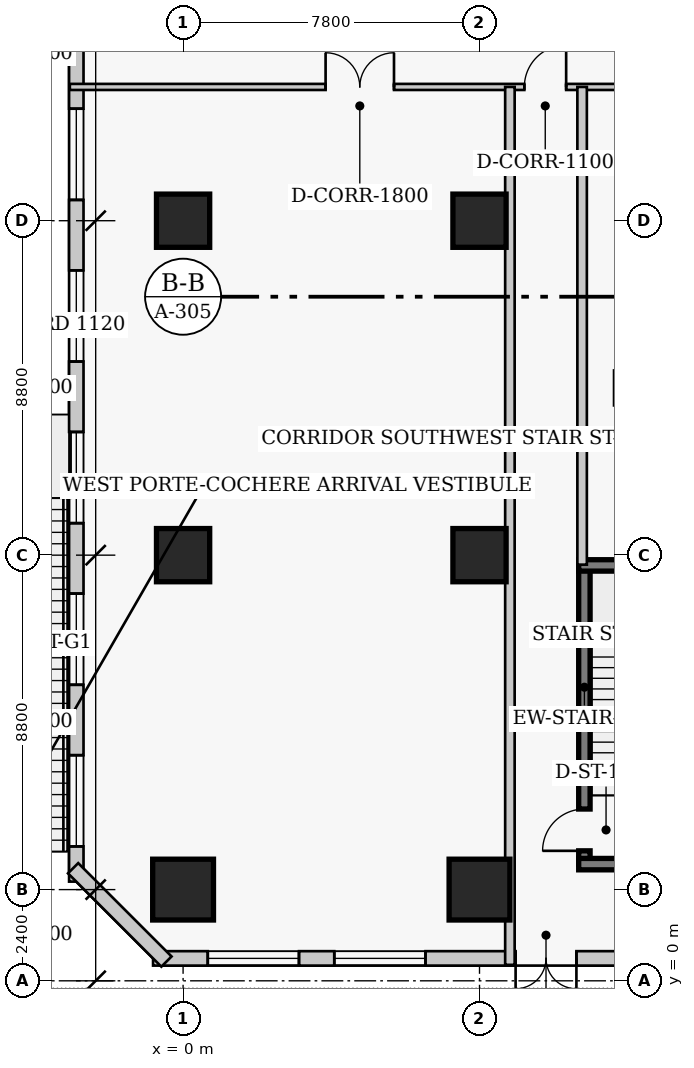
"""IFC4 building model, lengths in metres.
Left out: names, types, materials, properties, quantities, classifications, styles, units other than length and angle.
Written with IfcOpenShell. Run it as: python <this file> out.ifc"""

import sys

from ifc_helpers import new_model, si_unit, direction, frame, frame_2d, origin, origin_2d, place, context, subcontext, project, spatial, rectangle, extrude, element, fill, save


model = new_model("IFC4")
c1 = context("Model", 3, precision=1e-05, world=origin(), true_north=direction((0.0, 1.0)))
c2 = subcontext(c1, "Body", "Model", "MODEL_VIEW")
j1 = project(units=[si_unit("LENGTHUNIT", "METRE"), si_unit("PLANEANGLEUNIT", "RADIAN")], contexts=[c1])
p1 = place(None, origin())
s1 = spatial("IfcSite", under=j1, at=p1, CompositionType="ELEMENT")
p2 = place(p1, origin())
s2 = spatial("IfcBuilding", under=s1, at=p2, CompositionType="ELEMENT")
p3 = place(p2, origin())
s3 = spatial("IfcBuildingStorey", under=s2, at=p3, CompositionType="ELEMENT", Elevation=0.0)
p4 = place(p3, frame((10.56, 3.07, 0.0), z_axis=(0.0, 0.0, 1.0), x_axis=(0.0, 1.0, 0.0)))
e1 = element("IfcWall", 1, at=p4, inside=s3, PredefinedType="SHEAR", context=c2, shape_type="SweptSolid", body=[
    extrude(rectangle(XDim=7.86, YDim=0.3, at=frame_2d((3.93, 0.0))), origin(), (0.0, 0.0, 1.0), 5.4),
])
p5 = place(p4, frame((0.35, 0.0, 0.0)))
e2 = element("IfcOpeningElement", 2, at=p5, cuts=e1, PredefinedType="OPENING", context=c2, shape_type="SweptSolid", body=[
    extrude(rectangle(XDim=1.1, YDim=2.15, at=frame_2d((0.55, 1.075))), frame((0.0, 0.16, 0.0), z_axis=(0.0, -1.0, 0.0), x_axis=(1.0, 0.0, 0.0)), (0.0, 0.0, 1.0), 0.32),
])
for number, where, z_axis, x_axis in (
    (3, (10.41, 10.93, 0.0), (0.0, 0.0, 1.0), (1.0, 0.0, 0.0)),
    (4, (10.41, 3.07, 0.0), (0.0, 0.0, 1.0), (1.0, 0.0, 0.0)),
):
    element("IfcWall", number, at=place(p3, frame(where, z_axis=z_axis, x_axis=x_axis)), inside=s3, PredefinedType="SHEAR", context=c2, shape_type="SweptSolid", body=[
        extrude(rectangle(XDim=4.07, YDim=0.3, at=frame_2d((2.035, 0.0))), origin(), (0.0, 0.0, 1.0), 5.4),
    ])
p6 = place(p3, frame((0.0, 2.4, 0.0), z_axis=(0.0, 0.0, 1.0), x_axis=(1.0, 0.0, 0.0)))
e5 = element("IfcColumn", 5, at=p6, inside=s3, PredefinedType="COLUMN", context=c2, shape_type="SweptSolid", body=[
    extrude(rectangle(XDim=1.6, YDim=1.6, at=origin_2d()), origin(), (0.0, 0.0, 1.0), 5.4),
])
for number, where, z_axis, x_axis in (
    (6, (0.0, 11.2, 0.0), (0.0, 0.0, 1.0), (1.0, 0.0, 0.0)),
    (7, (0.0, 20.0, 0.0), (0.0, 0.0, 1.0), (1.0, 0.0, 0.0)),
):
    element("IfcColumn", number, at=place(p3, frame(where, z_axis=z_axis, x_axis=x_axis)), inside=s3, PredefinedType="COLUMN", context=c2, shape_type="SweptSolid", body=[
        extrude(rectangle(XDim=1.4, YDim=1.4, at=origin_2d()), origin(), (0.0, 0.0, 1.0), 5.4),
    ])
p7 = place(p3, frame((7.8, 2.4, 0.0), z_axis=(0.0, 0.0, 1.0), x_axis=(1.0, 0.0, 0.0)))
e8 = element("IfcColumn", 8, at=p7, inside=s3, PredefinedType="COLUMN", context=c2, shape_type="SweptSolid", body=[
    extrude(rectangle(XDim=1.6, YDim=1.6, at=origin_2d()), origin(), (0.0, 0.0, 1.0), 5.4),
])
for number, where, z_axis, x_axis in (
    (9, (7.8, 11.2, 0.0), (0.0, 0.0, 1.0), (1.0, 0.0, 0.0)),
    (10, (7.8, 20.0, 0.0), (0.0, 0.0, 1.0), (1.0, 0.0, 0.0)),
):
    element("IfcColumn", number, at=place(p3, frame(where, z_axis=z_axis, x_axis=x_axis)), inside=s3, PredefinedType="COLUMN", context=c2, shape_type="SweptSolid", body=[
        extrude(rectangle(XDim=1.4, YDim=1.4, at=origin_2d()), origin(), (0.0, 0.0, 1.0), 5.4),
    ])
p8 = place(p3, frame((78.79, 0.59, 0.0), z_axis=(0.0, 0.0, 1.0), x_axis=(-1.0, 0.0, 0.0)))
e11 = element("IfcWall", 11, at=p8, inside=s3, PredefinedType="SOLIDWALL", context=c2, shape_type="SweptSolid", body=[
    extrude(rectangle(XDim=79.58, YDim=0.38, at=frame_2d((39.79, 0.0))), origin(), (0.0, 0.0, 1.0), 5.1),
])
p9 = place(p8, frame((68.44, 0.0, 0.0)))
e12 = element("IfcOpeningElement", 12, at=p9, cuts=e11, PredefinedType="OPENING", context=c2, shape_type="SweptSolid", body=[
    extrude(rectangle(XDim=1.6, YDim=2.2, at=frame_2d((0.8, 1.1))), frame((0.0, 0.2, 0.0), z_axis=(0.0, -1.0, 0.0), x_axis=(1.0, 0.0, 0.0)), (0.0, 0.0, 1.0), 0.4),
])
p10 = place(p8, frame((56.79, 0.0, 0.0)))
e13 = element("IfcOpeningElement", 13, at=p10, cuts=e11, PredefinedType="OPENING", context=c2, shape_type="SweptSolid", body=[
    extrude(rectangle(XDim=2.4, YDim=2.55, at=frame_2d((1.2, 1.275))), frame((0.0, 0.2, 0.0), z_axis=(0.0, -1.0, 0.0), x_axis=(1.0, 0.0, 0.0)), (0.0, 0.0, 1.0), 0.4),
])
p11 = place(p8, frame((38.59, 0.0, 0.0)))
e14 = element("IfcOpeningElement", 14, at=p11, cuts=e11, PredefinedType="OPENING", context=c2, shape_type="SweptSolid", body=[
    extrude(rectangle(XDim=2.4, YDim=2.55, at=frame_2d((1.2, 1.275))), frame((0.0, 0.2, 0.0), z_axis=(0.0, -1.0, 0.0), x_axis=(1.0, 0.0, 0.0)), (0.0, 0.0, 1.0), 0.4),
])
p12 = place(p8, frame((19.49, 0.0, 0.0)))
e15 = element("IfcOpeningElement", 15, at=p12, cuts=e11, PredefinedType="OPENING", context=c2, shape_type="SweptSolid", body=[
    extrude(rectangle(XDim=1.6, YDim=2.2, at=frame_2d((0.8, 1.1))), frame((0.0, 0.2, 0.0), z_axis=(0.0, -1.0, 0.0), x_axis=(1.0, 0.0, 0.0)), (0.0, 0.0, 1.0), 0.4),
])
p13 = place(p8, frame((1.439, 0.0, 0.75)))
e16 = element("IfcOpeningElement", 16, at=p13, cuts=e11, PredefinedType="OPENING", context=c2, shape_type="SweptSolid", body=[
    extrude(rectangle(XDim=2.4, YDim=2.2, at=frame_2d((1.2, 1.1))), frame((0.0, 0.2, 0.0), z_axis=(0.0, -1.0, 0.0), x_axis=(1.0, 0.0, 0.0)), (0.0, 0.0, 1.0), 0.4),
])
p14 = place(p8, frame((4.769, 0.0, 0.75)))
e17 = element("IfcOpeningElement", 17, at=p14, cuts=e11, PredefinedType="OPENING", context=c2, shape_type="SweptSolid", body=[
    extrude(rectangle(XDim=2.4, YDim=2.2, at=frame_2d((1.2, 1.1))), frame((0.0, 0.2, 0.0), z_axis=(0.0, -1.0, 0.0), x_axis=(1.0, 0.0, 0.0)), (0.0, 0.0, 1.0), 0.4),
])
p15 = place(p8, frame((8.748, 0.0, 0.75)))
e18 = element("IfcOpeningElement", 18, at=p15, cuts=e11, PredefinedType="OPENING", context=c2, shape_type="SweptSolid", body=[
    extrude(rectangle(XDim=2.4, YDim=2.2, at=frame_2d((1.2, 1.1))), frame((0.0, 0.2, 0.0), z_axis=(0.0, -1.0, 0.0), x_axis=(1.0, 0.0, 0.0)), (0.0, 0.0, 1.0), 0.4),
])
p16 = place(p8, frame((12.727, 0.0, 0.75)))
e19 = element("IfcOpeningElement", 19, at=p16, cuts=e11, PredefinedType="OPENING", context=c2, shape_type="SweptSolid", body=[
    extrude(rectangle(XDim=2.4, YDim=2.2, at=frame_2d((1.2, 1.1))), frame((0.0, 0.2, 0.0), z_axis=(0.0, -1.0, 0.0), x_axis=(1.0, 0.0, 0.0)), (0.0, 0.0, 1.0), 0.4),
])
p17 = place(p8, frame((24.664, 0.0, 0.75)))
e20 = element("IfcOpeningElement", 20, at=p17, cuts=e11, PredefinedType="OPENING", context=c2, shape_type="SweptSolid", body=[
    extrude(rectangle(XDim=2.4, YDim=2.2, at=frame_2d((1.2, 1.1))), frame((0.0, 0.2, 0.0), z_axis=(0.0, -1.0, 0.0), x_axis=(1.0, 0.0, 0.0)), (0.0, 0.0, 1.0), 0.4),
])
p18 = place(p8, frame((28.643, 0.0, 0.75)))
e21 = element("IfcOpeningElement", 21, at=p18, cuts=e11, PredefinedType="OPENING", context=c2, shape_type="SweptSolid", body=[
    extrude(rectangle(XDim=2.4, YDim=2.2, at=frame_2d((1.2, 1.1))), frame((0.0, 0.2, 0.0), z_axis=(0.0, -1.0, 0.0), x_axis=(1.0, 0.0, 0.0)), (0.0, 0.0, 1.0), 0.4),
])
p19 = place(p8, frame((32.622, 0.0, 0.75)))
e22 = element("IfcOpeningElement", 22, at=p19, cuts=e11, PredefinedType="OPENING", context=c2, shape_type="SweptSolid", body=[
    extrude(rectangle(XDim=2.4, YDim=2.2, at=frame_2d((1.2, 1.1))), frame((0.0, 0.2, 0.0), z_axis=(0.0, -1.0, 0.0), x_axis=(1.0, 0.0, 0.0)), (0.0, 0.0, 1.0), 0.4),
])
p20 = place(p8, frame((44.559, 0.0, 0.75)))
e23 = element("IfcOpeningElement", 23, at=p20, cuts=e11, PredefinedType="OPENING", context=c2, shape_type="SweptSolid", body=[
    extrude(rectangle(XDim=2.4, YDim=2.2, at=frame_2d((1.2, 1.1))), frame((0.0, 0.2, 0.0), z_axis=(0.0, -1.0, 0.0), x_axis=(1.0, 0.0, 0.0)), (0.0, 0.0, 1.0), 0.4),
])
p21 = place(p8, frame((48.538, 0.0, 0.75)))
e24 = element("IfcOpeningElement", 24, at=p21, cuts=e11, PredefinedType="OPENING", context=c2, shape_type="SweptSolid", body=[
    extrude(rectangle(XDim=2.4, YDim=2.2, at=frame_2d((1.2, 1.1))), frame((0.0, 0.2, 0.0), z_axis=(0.0, -1.0, 0.0), x_axis=(1.0, 0.0, 0.0)), (0.0, 0.0, 1.0), 0.4),
])
p22 = place(p8, frame((52.517, 0.0, 0.75)))
e25 = element("IfcOpeningElement", 25, at=p22, cuts=e11, PredefinedType="OPENING", context=c2, shape_type="SweptSolid", body=[
    extrude(rectangle(XDim=2.4, YDim=2.2, at=frame_2d((1.2, 1.1))), frame((0.0, 0.2, 0.0), z_axis=(0.0, -1.0, 0.0), x_axis=(1.0, 0.0, 0.0)), (0.0, 0.0, 1.0), 0.4),
])
p23 = place(p8, frame((60.475, 0.0, 0.75)))
e26 = element("IfcOpeningElement", 26, at=p23, cuts=e11, PredefinedType="OPENING", context=c2, shape_type="SweptSolid", body=[
    extrude(rectangle(XDim=2.4, YDim=2.2, at=frame_2d((1.2, 1.1))), frame((0.0, 0.2, 0.0), z_axis=(0.0, -1.0, 0.0), x_axis=(1.0, 0.0, 0.0)), (0.0, 0.0, 1.0), 0.4),
])
p24 = place(p8, frame((72.412, 0.0, 0.75)))
e27 = element("IfcOpeningElement", 27, at=p24, cuts=e11, PredefinedType="OPENING", context=c2, shape_type="SweptSolid", body=[
    extrude(rectangle(XDim=2.4, YDim=2.2, at=frame_2d((1.2, 1.1))), frame((0.0, 0.2, 0.0), z_axis=(0.0, -1.0, 0.0), x_axis=(1.0, 0.0, 0.0)), (0.0, 0.0, 1.0), 0.4),
])
p25 = place(p8, frame((75.74, 0.0, 0.75)))
e28 = element("IfcOpeningElement", 28, at=p25, cuts=e11, PredefinedType="OPENING", context=c2, shape_type="SweptSolid", body=[
    extrude(rectangle(XDim=2.4, YDim=2.2, at=frame_2d((1.2, 1.1))), frame((0.0, 0.2, 0.0), z_axis=(0.0, -1.0, 0.0), x_axis=(1.0, 0.0, 0.0)), (0.0, 0.0, 1.0), 0.4),
])
p26 = place(p3, frame((-2.81, 2.61, 0.0), z_axis=(0.0, 0.0, 1.0), x_axis=(0.0, 1.0, 0.0)))
e29 = element("IfcWall", 29, at=p26, inside=s3, PredefinedType="SOLIDWALL", context=c2, shape_type="SweptSolid", body=[
    extrude(rectangle(XDim=46.78, YDim=0.38, at=frame_2d((23.39, 0.0))), origin(), (0.0, 0.0, 1.0), 5.1),
])
p27 = place(p26, frame((0.927, 0.0, 0.75)))
e30 = element("IfcOpeningElement", 30, at=p27, cuts=e29, PredefinedType="OPENING", context=c2, shape_type="SweptSolid", body=[
    extrude(rectangle(XDim=2.4, YDim=2.2, at=frame_2d((1.2, 1.1))), frame((0.0, 0.2, 0.0), z_axis=(0.0, -1.0, 0.0), x_axis=(1.0, 0.0, 0.0)), (0.0, 0.0, 1.0), 0.4),
])
p28 = place(p26, frame((5.179, 0.0, 0.75)))
e31 = element("IfcOpeningElement", 31, at=p28, cuts=e29, PredefinedType="OPENING", context=c2, shape_type="SweptSolid", body=[
    extrude(rectangle(XDim=2.4, YDim=2.2, at=frame_2d((1.2, 1.1))), frame((0.0, 0.2, 0.0), z_axis=(0.0, -1.0, 0.0), x_axis=(1.0, 0.0, 0.0)), (0.0, 0.0, 1.0), 0.4),
])
p29 = place(p26, frame((9.432, 0.0, 0.75)))
e32 = element("IfcOpeningElement", 32, at=p29, cuts=e29, PredefinedType="OPENING", context=c2, shape_type="SweptSolid", body=[
    extrude(rectangle(XDim=2.4, YDim=2.2, at=frame_2d((1.2, 1.1))), frame((0.0, 0.2, 0.0), z_axis=(0.0, -1.0, 0.0), x_axis=(1.0, 0.0, 0.0)), (0.0, 0.0, 1.0), 0.4),
])
p30 = place(p26, frame((13.685, 0.0, 0.75)))
e33 = element("IfcOpeningElement", 33, at=p30, cuts=e29, PredefinedType="OPENING", context=c2, shape_type="SweptSolid", body=[
    extrude(rectangle(XDim=2.4, YDim=2.2, at=frame_2d((1.2, 1.1))), frame((0.0, 0.2, 0.0), z_axis=(0.0, -1.0, 0.0), x_axis=(1.0, 0.0, 0.0)), (0.0, 0.0, 1.0), 0.4),
])
p31 = place(p26, frame((17.937, 0.0, 0.75)))
e34 = element("IfcOpeningElement", 34, at=p31, cuts=e29, PredefinedType="OPENING", context=c2, shape_type="SweptSolid", body=[
    extrude(rectangle(XDim=2.4, YDim=2.2, at=frame_2d((1.2, 1.1))), frame((0.0, 0.2, 0.0), z_axis=(0.0, -1.0, 0.0), x_axis=(1.0, 0.0, 0.0)), (0.0, 0.0, 1.0), 0.4),
])
p32 = place(p26, frame((26.443, 0.0, 0.75)))
e35 = element("IfcOpeningElement", 35, at=p32, cuts=e29, PredefinedType="OPENING", context=c2, shape_type="SweptSolid", body=[
    extrude(rectangle(XDim=2.4, YDim=2.2, at=frame_2d((1.2, 1.1))), frame((0.0, 0.2, 0.0), z_axis=(0.0, -1.0, 0.0), x_axis=(1.0, 0.0, 0.0)), (0.0, 0.0, 1.0), 0.4),
])
p33 = place(p26, frame((30.696, 0.0, 0.75)))
e36 = element("IfcOpeningElement", 36, at=p33, cuts=e29, PredefinedType="OPENING", context=c2, shape_type="SweptSolid", body=[
    extrude(rectangle(XDim=2.4, YDim=2.2, at=frame_2d((1.2, 1.1))), frame((0.0, 0.2, 0.0), z_axis=(0.0, -1.0, 0.0), x_axis=(1.0, 0.0, 0.0)), (0.0, 0.0, 1.0), 0.4),
])
p34 = place(p26, frame((34.948, 0.0, 0.75)))
e37 = element("IfcOpeningElement", 37, at=p34, cuts=e29, PredefinedType="OPENING", context=c2, shape_type="SweptSolid", body=[
    extrude(rectangle(XDim=2.4, YDim=2.2, at=frame_2d((1.2, 1.1))), frame((0.0, 0.2, 0.0), z_axis=(0.0, -1.0, 0.0), x_axis=(1.0, 0.0, 0.0)), (0.0, 0.0, 1.0), 0.4),
])
p35 = place(p26, frame((39.201, 0.0, 0.75)))
e38 = element("IfcOpeningElement", 38, at=p35, cuts=e29, PredefinedType="OPENING", context=c2, shape_type="SweptSolid", body=[
    extrude(rectangle(XDim=2.4, YDim=2.2, at=frame_2d((1.2, 1.1))), frame((0.0, 0.2, 0.0), z_axis=(0.0, -1.0, 0.0), x_axis=(1.0, 0.0, 0.0)), (0.0, 0.0, 1.0), 0.4),
])
p36 = place(p26, frame((43.454, 0.0, 0.75)))
e39 = element("IfcOpeningElement", 39, at=p36, cuts=e29, PredefinedType="OPENING", context=c2, shape_type="SweptSolid", body=[
    extrude(rectangle(XDim=2.4, YDim=2.2, at=frame_2d((1.2, 1.1))), frame((0.0, 0.2, 0.0), z_axis=(0.0, -1.0, 0.0), x_axis=(1.0, 0.0, 0.0)), (0.0, 0.0, 1.0), 0.4),
])
p37 = place(p3, frame((-0.438, 0.506, 0.0), z_axis=(0.0, 0.0, 1.0), x_axis=(-0.707071641081, 0.707141919546, 0.0)))
e40 = element("IfcWall", 40, at=p37, inside=s3, PredefinedType="SOLIDWALL", context=c2, shape_type="SweptSolid", body=[
    extrude(rectangle(XDim=3.474, YDim=0.38, at=frame_2d((1.737, 0.0))), origin(), (0.0, 0.0, 1.0), 5.1),
])
p38 = place(p3, frame((-2.98, 23.52, 0.0), z_axis=(0.0, 0.0, 1.0), x_axis=(1.0, 0.0, 0.0)))
e41 = element("IfcWall", 41, at=p38, inside=s3, PredefinedType="PARTITIONING", context=c2, shape_type="SweptSolid", body=[
    extrude(rectangle(XDim=83.96, YDim=0.16, at=frame_2d((41.98, 0.0))), origin(), (0.0, 0.0, 1.0), 5.1),
])
p39 = place(p38, frame((11.96, 0.0, 0.0)))
e42 = element("IfcOpeningElement", 42, at=p39, cuts=e41, PredefinedType="OPENING", context=c2, shape_type="SweptSolid", body=[
    extrude(rectangle(XDim=1.1, YDim=2.15, at=frame_2d((0.55, 1.075))), frame((0.0, 0.09, 0.0), z_axis=(0.0, -1.0, 0.0), x_axis=(1.0, 0.0, 0.0)), (0.0, 0.0, 1.0), 0.18),
])
p40 = place(p38, frame((6.73, 0.0, 0.0)))
e43 = element("IfcOpeningElement", 43, at=p40, cuts=e41, PredefinedType="OPENING", context=c2, shape_type="SweptSolid", body=[
    extrude(rectangle(XDim=1.8, YDim=2.2, at=frame_2d((0.9, 1.1))), frame((0.0, 0.09, 0.0), z_axis=(0.0, -1.0, 0.0), x_axis=(1.0, 0.0, 0.0)), (0.0, 0.0, 1.0), 0.18),
])
p41 = place(p38, frame((24.38, 0.0, 0.0)))
e44 = element("IfcOpeningElement", 44, at=p41, cuts=e41, PredefinedType="OPENING", context=c2, shape_type="SweptSolid", body=[
    extrude(rectangle(XDim=2.2, YDim=2.4, at=frame_2d((1.1, 1.2))), frame((0.0, 0.09, 0.0), z_axis=(0.0, -1.0, 0.0), x_axis=(1.0, 0.0, 0.0)), (0.0, 0.0, 1.0), 0.18),
])
p42 = place(p38, frame((40.88, 0.0, 0.0)))
e45 = element("IfcOpeningElement", 45, at=p42, cuts=e41, PredefinedType="OPENING", context=c2, shape_type="SweptSolid", body=[
    extrude(rectangle(XDim=2.2, YDim=2.4, at=frame_2d((1.1, 1.2))), frame((0.0, 0.09, 0.0), z_axis=(0.0, -1.0, 0.0), x_axis=(1.0, 0.0, 0.0)), (0.0, 0.0, 1.0), 0.18),
])
p43 = place(p38, frame((56.63, 0.0, 0.0)))
e46 = element("IfcOpeningElement", 46, at=p43, cuts=e41, PredefinedType="OPENING", context=c2, shape_type="SweptSolid", body=[
    extrude(rectangle(XDim=2.2, YDim=2.4, at=frame_2d((1.1, 1.2))), frame((0.0, 0.09, 0.0), z_axis=(0.0, -1.0, 0.0), x_axis=(1.0, 0.0, 0.0)), (0.0, 0.0, 1.0), 0.18),
])
p44 = place(p38, frame((67.14, 0.0, 0.0)))
e47 = element("IfcOpeningElement", 47, at=p44, cuts=e41, PredefinedType="OPENING", context=c2, shape_type="SweptSolid", body=[
    extrude(rectangle(XDim=0.88, YDim=2.05, at=frame_2d((0.44, 1.025))), frame((0.0, 0.09, 0.0), z_axis=(0.0, -1.0, 0.0), x_axis=(1.0, 0.0, 0.0)), (0.0, 0.0, 1.0), 0.18),
])
p45 = place(p38, frame((73.29, 0.0, 0.0)))
e48 = element("IfcOpeningElement", 48, at=p45, cuts=e41, PredefinedType="OPENING", context=c2, shape_type="SweptSolid", body=[
    extrude(rectangle(XDim=0.88, YDim=2.05, at=frame_2d((0.44, 1.025))), frame((0.0, 0.09, 0.0), z_axis=(0.0, -1.0, 0.0), x_axis=(1.0, 0.0, 0.0)), (0.0, 0.0, 1.0), 0.18),
])
p46 = place(p3, frame((8.6, 0.42, 0.0), z_axis=(0.0, 0.0, 1.0), x_axis=(0.0, 1.0, 0.0)))
e49 = element("IfcWall", 49, at=p46, inside=s3, PredefinedType="SOLIDWALL", context=c2, shape_type="SweptSolid", body=[
    extrude(rectangle(XDim=23.1, YDim=0.25, at=frame_2d((11.55, 0.0))), origin(), (0.0, 0.0, 1.0), 5.1),
])
p47 = place(p3, frame((10.5, 10.95, 0.0), z_axis=(0.0, 0.0, 1.0), x_axis=(0.0, 1.0, 0.0)))
e50 = element("IfcWall", 50, at=p47, inside=s3, PredefinedType="SOLIDWALL", context=c2, shape_type="SweptSolid", body=[
    extrude(rectangle(XDim=12.57, YDim=0.25, at=frame_2d((6.285, 0.0))), origin(), (0.0, 0.0, 1.0), 5.1),
])
p48 = place(p9, origin())
e51 = element("IfcDoor", 51, at=p48, inside=s3, OperationType="DOUBLE_DOOR_SINGLE_SWING", PredefinedType="DOOR", context=c2, shape_type="SweptSolid", body=[
    extrude(rectangle(XDim=1.6, YDim=2.2, at=frame_2d((0.8, 1.1))), frame((0.0, 0.025, 0.0), z_axis=(0.0, -1.0, 0.0), x_axis=(1.0, 0.0, 0.0)), (0.0, 0.0, 1.0), 0.05),
])
fill(e12, e51)
p49 = place(p24, origin())
e52 = element("IfcWindow", 52, at=p49, inside=s3, PartitioningType="SINGLE_PANEL", PredefinedType="WINDOW", context=c2, shape_type="SweptSolid", body=[
    extrude(rectangle(XDim=2.4, YDim=2.2, at=frame_2d((1.2, 1.1))), frame((0.0, 0.03, 0.0), z_axis=(0.0, -1.0, 0.0), x_axis=(1.0, 0.0, 0.0)), (0.0, 0.0, 1.0), 0.06),
])
fill(e27, e52)
p50 = place(p25, origin())
e53 = element("IfcWindow", 53, at=p50, inside=s3, PartitioningType="SINGLE_PANEL", PredefinedType="WINDOW", context=c2, shape_type="SweptSolid", body=[
    extrude(rectangle(XDim=2.4, YDim=2.2, at=frame_2d((1.2, 1.1))), frame((0.0, 0.03, 0.0), z_axis=(0.0, -1.0, 0.0), x_axis=(1.0, 0.0, 0.0)), (0.0, 0.0, 1.0), 0.06),
])
fill(e28, e53)
p51 = place(p27, origin())
e54 = element("IfcWindow", 54, at=p51, inside=s3, PartitioningType="SINGLE_PANEL", PredefinedType="WINDOW", context=c2, shape_type="SweptSolid", body=[
    extrude(rectangle(XDim=2.4, YDim=2.2, at=frame_2d((1.2, 1.1))), frame((0.0, 0.03, 0.0), z_axis=(0.0, -1.0, 0.0), x_axis=(1.0, 0.0, 0.0)), (0.0, 0.0, 1.0), 0.06),
])
fill(e30, e54)
p52 = place(p28, origin())
e55 = element("IfcWindow", 55, at=p52, inside=s3, PartitioningType="SINGLE_PANEL", PredefinedType="WINDOW", context=c2, shape_type="SweptSolid", body=[
    extrude(rectangle(XDim=2.4, YDim=2.2, at=frame_2d((1.2, 1.1))), frame((0.0, 0.03, 0.0), z_axis=(0.0, -1.0, 0.0), x_axis=(1.0, 0.0, 0.0)), (0.0, 0.0, 1.0), 0.06),
])
fill(e31, e55)
p53 = place(p29, origin())
e56 = element("IfcWindow", 56, at=p53, inside=s3, PartitioningType="SINGLE_PANEL", PredefinedType="WINDOW", context=c2, shape_type="SweptSolid", body=[
    extrude(rectangle(XDim=2.4, YDim=2.2, at=frame_2d((1.2, 1.1))), frame((0.0, 0.03, 0.0), z_axis=(0.0, -1.0, 0.0), x_axis=(1.0, 0.0, 0.0)), (0.0, 0.0, 1.0), 0.06),
])
fill(e32, e56)
p54 = place(p30, origin())
e57 = element("IfcWindow", 57, at=p54, inside=s3, PartitioningType="SINGLE_PANEL", PredefinedType="WINDOW", context=c2, shape_type="SweptSolid", body=[
    extrude(rectangle(XDim=2.4, YDim=2.2, at=frame_2d((1.2, 1.1))), frame((0.0, 0.03, 0.0), z_axis=(0.0, -1.0, 0.0), x_axis=(1.0, 0.0, 0.0)), (0.0, 0.0, 1.0), 0.06),
])
fill(e33, e57)
p55 = place(p31, origin())
e58 = element("IfcWindow", 58, at=p55, inside=s3, PartitioningType="SINGLE_PANEL", PredefinedType="WINDOW", context=c2, shape_type="SweptSolid", body=[
    extrude(rectangle(XDim=2.4, YDim=2.2, at=frame_2d((1.2, 1.1))), frame((0.0, 0.03, 0.0), z_axis=(0.0, -1.0, 0.0), x_axis=(1.0, 0.0, 0.0)), (0.0, 0.0, 1.0), 0.06),
])
fill(e34, e58)
p56 = place(p39, origin())
e59 = element("IfcDoor", 59, at=p56, inside=s3, OperationType="SINGLE_SWING_RIGHT", PredefinedType="DOOR", context=c2, shape_type="SweptSolid", body=[
    extrude(rectangle(XDim=1.1, YDim=2.15, at=frame_2d((0.55, 1.075))), frame((0.0, 0.025, 0.0), z_axis=(0.0, -1.0, 0.0), x_axis=(1.0, 0.0, 0.0)), (0.0, 0.0, 1.0), 0.05),
])
fill(e42, e59)
p57 = place(p40, origin())
e60 = element("IfcDoor", 60, at=p57, inside=s3, OperationType="DOUBLE_DOOR_SINGLE_SWING", PredefinedType="DOOR", context=c2, shape_type="SweptSolid", body=[
    extrude(rectangle(XDim=1.8, YDim=2.2, at=frame_2d((0.9, 1.1))), frame((0.0, 0.025, 0.0), z_axis=(0.0, -1.0, 0.0), x_axis=(1.0, 0.0, 0.0)), (0.0, 0.0, 1.0), 0.05),
])
fill(e43, e60)
p58 = place(p5, origin())
e61 = element("IfcDoor", 61, at=p58, inside=s3, OperationType="SINGLE_SWING_LEFT", PredefinedType="DOOR", context=c2, shape_type="SweptSolid", body=[
    extrude(rectangle(XDim=1.1, YDim=2.15, at=frame_2d((0.55, 1.075))), frame((0.0, 0.025, 0.0), z_axis=(0.0, -1.0, 0.0), x_axis=(1.0, 0.0, 0.0)), (0.0, 0.0, 1.0), 0.05),
])
fill(e2, e61)
save(model, sys.argv[1])
